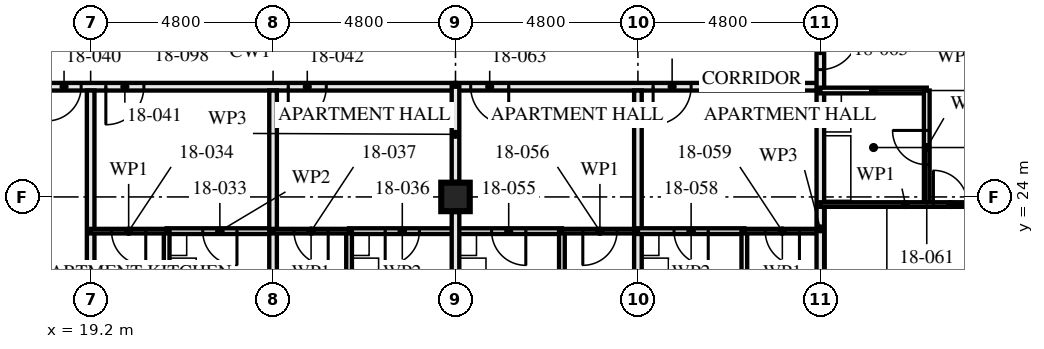
"""IFC4 building model, lengths in metres.
Left out: names, types, materials, properties, quantities, classifications, styles, units other than length and angle.
Written with IfcOpenShell. Run it as: python <this file> out.ifc"""

import sys

from ifc_helpers import new_model, si_unit, direction, frame, frame_2d, origin, origin_2d, place, context, subcontext, project, spatial, rectangle, hollow_rectangle, extrude, element, fill, save


model = new_model("IFC4")
c1 = context("Model", 3, precision=1e-05, world=origin(), true_north=direction((0.0, 1.0)))
c2 = subcontext(c1, "Body", "Model", "MODEL_VIEW")
j1 = project(units=[si_unit("LENGTHUNIT", "METRE"), si_unit("PLANEANGLEUNIT", "RADIAN")], contexts=[c1])
p1 = place(None, origin())
s1 = spatial("IfcSite", under=j1, at=p1, CompositionType="ELEMENT")
p2 = place(p1, origin())
s2 = spatial("IfcBuilding", under=s1, at=p2, CompositionType="ELEMENT")
p3 = place(p2, frame((0.0, 0.0, 69.0)))
s3 = spatial("IfcBuildingStorey", under=s2, at=p3, CompositionType="ELEMENT", Elevation=69.0)
p4 = place(p3, frame((28.8, 24.0, 0.0), z_axis=(0.0, 0.0, 1.0), x_axis=(1.0, 0.0, 0.0)))
e1 = element("IfcColumn", 1, at=p4, inside=s3, PredefinedType="COLUMN", context=c2, shape_type="SweptSolid", body=[
    extrude(hollow_rectangle(XDim=0.75, YDim=0.75, WallThickness=0.08, at=origin_2d()), origin(), (0.0, 0.0, 1.0), 3.5),
])
p5 = place(p3, frame((19.2, 14.72, 0.0), z_axis=(0.0, 0.0, 1.0), x_axis=(0.0, 1.0, 0.0)))
e2 = element("IfcWall", 2, at=p5, inside=s3, PredefinedType="PARTITIONING", context=c2, shape_type="SweptSolid", body=[
    extrude(rectangle(XDim=12.08, YDim=0.2, at=frame_2d((6.04, 0.0))), origin(), (0.0, 0.0, 1.0), 2.55),
])
p6 = place(p3, frame((21.2, 20.1, 0.0), z_axis=(0.0, 0.0, 1.0), x_axis=(0.0, 1.0, 0.0)))
e3 = element("IfcWall", 3, at=p6, inside=s3, PredefinedType="PARTITIONING", context=c2, shape_type="SweptSolid", body=[
    extrude(rectangle(XDim=3.0, YDim=0.15, at=frame_2d((1.5, 0.0))), origin(), (0.0, 0.0, 1.0), 3.33),
])
p7 = place(p3, frame((21.2, 23.1, 0.0), z_axis=(0.0, 0.0, 1.0), x_axis=(1.0, 0.0, 0.0)))
e4 = element("IfcWall", 4, at=p7, inside=s3, PredefinedType="PARTITIONING", context=c2, shape_type="SweptSolid", body=[
    extrude(rectangle(XDim=2.8, YDim=0.15, at=frame_2d((1.4, 0.0))), origin(), (0.0, 0.0, 1.0), 3.33),
])
p8 = place(p7, frame((0.95, 0.0, 0.0)))
e5 = element("IfcOpeningElement", 5, at=p8, cuts=e4, PredefinedType="OPENING", context=c2, shape_type="SweptSolid", body=[
    extrude(rectangle(XDim=0.9, YDim=2.1, at=frame_2d((0.45, 1.05))), frame((0.0, 0.085, 0.0), z_axis=(0.0, -1.0, 0.0), x_axis=(1.0, 0.0, 0.0)), (0.0, 0.0, 1.0), 0.171),
])
p9 = place(p3, frame((19.2, 23.1, 0.0), z_axis=(0.0, 0.0, 1.0), x_axis=(1.0, 0.0, 0.0)))
e6 = element("IfcWall", 6, at=p9, inside=s3, PredefinedType="PARTITIONING", context=c2, shape_type="SweptSolid", body=[
    extrude(rectangle(XDim=2.0, YDim=0.12, at=frame_2d((1.0, 0.0))), origin(), (0.0, 0.0, 1.0), 3.33),
])
p10 = place(p9, frame((0.55, 0.0, 0.0)))
e7 = element("IfcOpeningElement", 7, at=p10, cuts=e6, PredefinedType="OPENING", context=c2, shape_type="SweptSolid", body=[
    extrude(rectangle(XDim=0.9, YDim=2.1, at=frame_2d((0.45, 1.05))), frame((0.0, 0.071, 0.0), z_axis=(0.0, -1.0, 0.0), x_axis=(1.0, 0.0, 0.0)), (0.0, 0.0, 1.0), 0.141),
])
p11 = place(p3, frame((24.0, 14.72, 0.0), z_axis=(0.0, 0.0, 1.0), x_axis=(0.0, 1.0, 0.0)))
e8 = element("IfcWall", 8, at=p11, inside=s3, PredefinedType="PARTITIONING", context=c2, shape_type="SweptSolid", body=[
    extrude(rectangle(XDim=12.08, YDim=0.2, at=frame_2d((6.04, 0.0))), origin(), (0.0, 0.0, 1.0), 2.55),
])
p12 = place(p3, frame((26.0, 20.1, 0.0), z_axis=(0.0, 0.0, 1.0), x_axis=(0.0, 1.0, 0.0)))
e9 = element("IfcWall", 9, at=p12, inside=s3, PredefinedType="PARTITIONING", context=c2, shape_type="SweptSolid", body=[
    extrude(rectangle(XDim=3.0, YDim=0.15, at=frame_2d((1.5, 0.0))), origin(), (0.0, 0.0, 1.0), 3.33),
])
p13 = place(p3, frame((26.0, 23.1, 0.0), z_axis=(0.0, 0.0, 1.0), x_axis=(1.0, 0.0, 0.0)))
e10 = element("IfcWall", 10, at=p13, inside=s3, PredefinedType="PARTITIONING", context=c2, shape_type="SweptSolid", body=[
    extrude(rectangle(XDim=2.8, YDim=0.15, at=frame_2d((1.4, 0.0))), origin(), (0.0, 0.0, 1.0), 3.33),
])
p14 = place(p13, frame((0.95, 0.0, 0.0)))
e11 = element("IfcOpeningElement", 11, at=p14, cuts=e10, PredefinedType="OPENING", context=c2, shape_type="SweptSolid", body=[
    extrude(rectangle(XDim=0.9, YDim=2.1, at=frame_2d((0.45, 1.05))), frame((0.0, 0.085, 0.0), z_axis=(0.0, -1.0, 0.0), x_axis=(1.0, 0.0, 0.0)), (0.0, 0.0, 1.0), 0.171),
])
p15 = place(p3, frame((24.0, 23.1, 0.0), z_axis=(0.0, 0.0, 1.0), x_axis=(1.0, 0.0, 0.0)))
e12 = element("IfcWall", 12, at=p15, inside=s3, PredefinedType="PARTITIONING", context=c2, shape_type="SweptSolid", body=[
    extrude(rectangle(XDim=2.0, YDim=0.12, at=frame_2d((1.0, 0.0))), origin(), (0.0, 0.0, 1.0), 3.33),
])
p16 = place(p15, frame((0.55, 0.0, 0.0)))
e13 = element("IfcOpeningElement", 13, at=p16, cuts=e12, PredefinedType="OPENING", context=c2, shape_type="SweptSolid", body=[
    extrude(rectangle(XDim=0.9, YDim=2.1, at=frame_2d((0.45, 1.05))), frame((0.0, 0.071, 0.0), z_axis=(0.0, -1.0, 0.0), x_axis=(1.0, 0.0, 0.0)), (0.0, 0.0, 1.0), 0.141),
])
p17 = place(p3, frame((14.4, 26.9, 0.0), z_axis=(0.0, 0.0, 1.0), x_axis=(1.0, 0.0, 0.0)))
e14 = element("IfcWall", 14, at=p17, inside=s3, PredefinedType="PARTITIONING", context=c2, shape_type="SweptSolid", body=[
    extrude(rectangle(XDim=14.4, YDim=0.2, at=frame_2d((7.2, 0.0))), origin(), (0.0, 0.0, 1.0), 2.55),
])
p18 = place(p17, frame((1.4, 0.0, 0.0)))
e15 = element("IfcOpeningElement", 15, at=p18, cuts=e14, PredefinedType="OPENING", context=c2, shape_type="SweptSolid", body=[
    extrude(rectangle(XDim=1.0, YDim=2.1, at=frame_2d((0.5, 1.05))), frame((0.0, 0.111, 0.0), z_axis=(0.0, -1.0, 0.0), x_axis=(1.0, 0.0, 0.0)), (0.0, 0.0, 1.0), 0.221),
])
p19 = place(p17, frame((3.65, 0.0, 0.0)))
e16 = element("IfcOpeningElement", 16, at=p19, cuts=e14, PredefinedType="OPENING", context=c2, shape_type="SweptSolid", body=[
    extrude(rectangle(XDim=0.9, YDim=2.1, at=frame_2d((0.45, 1.05))), frame((0.0, 0.111, 0.0), z_axis=(0.0, -1.0, 0.0), x_axis=(1.0, 0.0, 0.0)), (0.0, 0.0, 1.0), 0.221),
])
p20 = place(p17, frame((5.2, 0.0, 0.0)))
e17 = element("IfcOpeningElement", 17, at=p20, cuts=e14, PredefinedType="OPENING", context=c2, shape_type="SweptSolid", body=[
    extrude(rectangle(XDim=1.0, YDim=2.1, at=frame_2d((0.5, 1.05))), frame((0.0, 0.111, 0.0), z_axis=(0.0, -1.0, 0.0), x_axis=(1.0, 0.0, 0.0)), (0.0, 0.0, 1.0), 0.221),
])
p21 = place(p17, frame((10.0, 0.0, 0.0)))
e18 = element("IfcOpeningElement", 18, at=p21, cuts=e14, PredefinedType="OPENING", context=c2, shape_type="SweptSolid", body=[
    extrude(rectangle(XDim=1.0, YDim=2.1, at=frame_2d((0.5, 1.05))), frame((0.0, 0.111, 0.0), z_axis=(0.0, -1.0, 0.0), x_axis=(1.0, 0.0, 0.0)), (0.0, 0.0, 1.0), 0.221),
])
p22 = place(p3, frame((31.6, 20.1, 0.0), z_axis=(0.0, 0.0, 1.0), x_axis=(0.0, 1.0, 0.0)))
e19 = element("IfcWall", 19, at=p22, inside=s3, PredefinedType="PARTITIONING", context=c2, shape_type="SweptSolid", body=[
    extrude(rectangle(XDim=3.0, YDim=0.15, at=frame_2d((1.5, 0.0))), origin(), (0.0, 0.0, 1.0), 3.33),
])
p23 = place(p3, frame((28.8, 23.1, 0.0), z_axis=(0.0, 0.0, 1.0), x_axis=(1.0, 0.0, 0.0)))
e20 = element("IfcWall", 20, at=p23, inside=s3, PredefinedType="PARTITIONING", context=c2, shape_type="SweptSolid", body=[
    extrude(rectangle(XDim=2.8, YDim=0.15, at=frame_2d((1.4, 0.0))), origin(), (0.0, 0.0, 1.0), 3.33),
])
p24 = place(p23, frame((0.95, 0.0, 0.0)))
e21 = element("IfcOpeningElement", 21, at=p24, cuts=e20, PredefinedType="OPENING", context=c2, shape_type="SweptSolid", body=[
    extrude(rectangle(XDim=0.9, YDim=2.1, at=frame_2d((0.45, 1.05))), frame((0.0, 0.085, 0.0), z_axis=(0.0, -1.0, 0.0), x_axis=(1.0, 0.0, 0.0)), (0.0, 0.0, 1.0), 0.171),
])
p25 = place(p3, frame((31.6, 23.1, 0.0), z_axis=(0.0, 0.0, 1.0), x_axis=(1.0, 0.0, 0.0)))
e22 = element("IfcWall", 22, at=p25, inside=s3, PredefinedType="PARTITIONING", context=c2, shape_type="SweptSolid", body=[
    extrude(rectangle(XDim=2.0, YDim=0.12, at=frame_2d((1.0, 0.0))), origin(), (0.0, 0.0, 1.0), 3.33),
])
p26 = place(p25, frame((0.55, 0.0, 0.0)))
e23 = element("IfcOpeningElement", 23, at=p26, cuts=e22, PredefinedType="OPENING", context=c2, shape_type="SweptSolid", body=[
    extrude(rectangle(XDim=0.9, YDim=2.1, at=frame_2d((0.45, 1.05))), frame((0.0, 0.071, 0.0), z_axis=(0.0, -1.0, 0.0), x_axis=(1.0, 0.0, 0.0)), (0.0, 0.0, 1.0), 0.141),
])
p27 = place(p3, frame((33.6, 14.72, 0.0), z_axis=(0.0, 0.0, 1.0), x_axis=(0.0, 1.0, 0.0)))
e24 = element("IfcWall", 24, at=p27, inside=s3, PredefinedType="PARTITIONING", context=c2, shape_type="SweptSolid", body=[
    extrude(rectangle(XDim=12.08, YDim=0.2, at=frame_2d((6.04, 0.0))), origin(), (0.0, 0.0, 1.0), 2.55),
])
p28 = place(p3, frame((36.4, 20.1, 0.0), z_axis=(0.0, 0.0, 1.0), x_axis=(0.0, 1.0, 0.0)))
e25 = element("IfcWall", 25, at=p28, inside=s3, PredefinedType="PARTITIONING", context=c2, shape_type="SweptSolid", body=[
    extrude(rectangle(XDim=3.0, YDim=0.15, at=frame_2d((1.5, 0.0))), origin(), (0.0, 0.0, 1.0), 3.33),
])
p29 = place(p3, frame((33.6, 23.1, 0.0), z_axis=(0.0, 0.0, 1.0), x_axis=(1.0, 0.0, 0.0)))
e26 = element("IfcWall", 26, at=p29, inside=s3, PredefinedType="PARTITIONING", context=c2, shape_type="SweptSolid", body=[
    extrude(rectangle(XDim=2.8, YDim=0.15, at=frame_2d((1.4, 0.0))), origin(), (0.0, 0.0, 1.0), 3.33),
])
p30 = place(p29, frame((0.95, 0.0, 0.0)))
e27 = element("IfcOpeningElement", 27, at=p30, cuts=e26, PredefinedType="OPENING", context=c2, shape_type="SweptSolid", body=[
    extrude(rectangle(XDim=0.9, YDim=2.1, at=frame_2d((0.45, 1.05))), frame((0.0, 0.085, 0.0), z_axis=(0.0, -1.0, 0.0), x_axis=(1.0, 0.0, 0.0)), (0.0, 0.0, 1.0), 0.171),
])
p31 = place(p3, frame((36.4, 23.1, 0.0), z_axis=(0.0, 0.0, 1.0), x_axis=(1.0, 0.0, 0.0)))
e28 = element("IfcWall", 28, at=p31, inside=s3, PredefinedType="PARTITIONING", context=c2, shape_type="SweptSolid", body=[
    extrude(rectangle(XDim=2.0, YDim=0.12, at=frame_2d((1.0, 0.0))), origin(), (0.0, 0.0, 1.0), 3.33),
])
p32 = place(p31, frame((0.55, 0.0, 0.0)))
e29 = element("IfcOpeningElement", 29, at=p32, cuts=e28, PredefinedType="OPENING", context=c2, shape_type="SweptSolid", body=[
    extrude(rectangle(XDim=0.9, YDim=2.1, at=frame_2d((0.45, 1.05))), frame((0.0, 0.071, 0.0), z_axis=(0.0, -1.0, 0.0), x_axis=(1.0, 0.0, 0.0)), (0.0, 0.0, 1.0), 0.141),
])
p33 = place(p3, frame((38.4, 19.52, 0.0), z_axis=(0.0, 0.0, 1.0), x_axis=(0.0, 1.0, 0.0)))
e30 = element("IfcWall", 30, at=p33, inside=s3, PredefinedType="PARTITIONING", context=c2, shape_type="SweptSolid", body=[
    extrude(rectangle(XDim=7.28, YDim=0.2, at=frame_2d((3.64, 0.0))), origin(), (0.0, 0.0, 1.0), 2.55),
])
p34 = place(p3, frame((41.2, 23.8, 0.0), z_axis=(0.0, 0.0, 1.0), x_axis=(0.0, 1.0, 0.0)))
e31 = element("IfcWall", 31, at=p34, inside=s3, PredefinedType="PARTITIONING", context=c2, shape_type="SweptSolid", body=[
    extrude(rectangle(XDim=3.0, YDim=0.15, at=frame_2d((1.5, 0.0))), origin(), (0.0, 0.0, 1.0), 2.55),
])
p35 = place(p34, frame((1.05, 0.0, 0.0)))
e32 = element("IfcOpeningElement", 32, at=p35, cuts=e31, PredefinedType="OPENING", context=c2, shape_type="SweptSolid", body=[
    extrude(rectangle(XDim=0.9, YDim=2.1, at=frame_2d((0.45, 1.05))), frame((0.0, 0.085, 0.0), z_axis=(0.0, -1.0, 0.0), x_axis=(1.0, 0.0, 0.0)), (0.0, 0.0, 1.0), 0.171),
])
p36 = place(p3, frame((38.4, 26.8, 0.0), z_axis=(0.0, 0.0, 1.0), x_axis=(1.0, 0.0, 0.0)))
e33 = element("IfcWall", 33, at=p36, inside=s3, PredefinedType="PARTITIONING", context=c2, shape_type="SweptSolid", body=[
    extrude(rectangle(XDim=2.8, YDim=0.15, at=frame_2d((1.4, 0.0))), origin(), (0.0, 0.0, 1.0), 3.33),
])
p37 = place(p3, frame((38.4, 23.8, 0.0), z_axis=(0.0, 0.0, 1.0), x_axis=(1.0, 0.0, 0.0)))
e34 = element("IfcWall", 34, at=p37, inside=s3, PredefinedType="PARTITIONING", context=c2, shape_type="SweptSolid", body=[
    extrude(rectangle(XDim=4.48, YDim=0.12, at=frame_2d((2.24, 0.0))), origin(), (0.0, 0.0, 1.0), 3.33),
])
p38 = place(p37, frame((2.975, 0.0, 0.0)))
e35 = element("IfcOpeningElement", 35, at=p38, cuts=e34, PredefinedType="OPENING", context=c2, shape_type="SweptSolid", body=[
    extrude(rectangle(XDim=0.9, YDim=2.1, at=frame_2d((0.45, 1.05))), frame((0.0, 0.071, 0.0), z_axis=(0.0, -1.0, 0.0), x_axis=(1.0, 0.0, 0.0)), (0.0, 0.0, 1.0), 0.141),
])
p39 = place(p3, frame((28.8, 26.9, 0.0), z_axis=(0.0, 0.0, 1.0), x_axis=(1.0, 0.0, 0.0)))
e36 = element("IfcWall", 36, at=p39, inside=s3, PredefinedType="PARTITIONING", context=c2, shape_type="SweptSolid", body=[
    extrude(rectangle(XDim=9.6, YDim=0.2, at=frame_2d((4.8, 0.0))), origin(), (0.0, 0.0, 1.0), 3.33),
])
p40 = place(p39, frame((0.4, 0.0, 0.0)))
e37 = element("IfcOpeningElement", 37, at=p40, cuts=e36, PredefinedType="OPENING", context=c2, shape_type="SweptSolid", body=[
    extrude(rectangle(XDim=1.0, YDim=2.1, at=frame_2d((0.5, 1.05))), frame((0.0, 0.111, 0.0), z_axis=(0.0, -1.0, 0.0), x_axis=(1.0, 0.0, 0.0)), (0.0, 0.0, 1.0), 0.221),
])
p41 = place(p39, frame((5.2, 0.0, 0.0)))
e38 = element("IfcOpeningElement", 38, at=p41, cuts=e36, PredefinedType="OPENING", context=c2, shape_type="SweptSolid", body=[
    extrude(rectangle(XDim=1.0, YDim=2.1, at=frame_2d((0.5, 1.05))), frame((0.0, 0.111, 0.0), z_axis=(0.0, -1.0, 0.0), x_axis=(1.0, 0.0, 0.0)), (0.0, 0.0, 1.0), 0.221),
])
p42 = place(p3, frame((38.4, 26.8, 0.0), z_axis=(0.0, 0.0, 1.0), x_axis=(0.0, 1.0, 0.0)))
e39 = element("IfcWall", 39, at=p42, inside=s3, PredefinedType="PARTITIONING", context=c2, shape_type="SweptSolid", body=[
    extrude(rectangle(XDim=1.605, YDim=0.2, at=frame_2d((0.802, 0.0))), origin(), (0.0, 0.0, 1.0), 3.33),
])
p43 = place(p42, frame((0.55, 0.0, 0.0)))
e40 = element("IfcOpeningElement", 40, at=p43, cuts=e39, PredefinedType="OPENING", context=c2, shape_type="SweptSolid", body=[
    extrude(rectangle(XDim=1.0, YDim=2.1, at=frame_2d((0.5, 1.05))), frame((0.0, 0.111, 0.0), z_axis=(0.0, -1.0, 0.0), x_axis=(1.0, 0.0, 0.0)), (0.0, 0.0, 1.0), 0.221),
])
p44 = place(p3, frame((28.8, 19.595, 0.0), z_axis=(0.0, 0.0, 1.0), x_axis=(0.0, 1.0, 0.0)))
e41 = element("IfcWall", 41, at=p44, inside=s3, PredefinedType="PARTITIONING", context=c2, shape_type="SweptSolid", body=[
    extrude(rectangle(XDim=4.01, YDim=0.2, at=frame_2d((2.005, 0.0))), origin(), (0.0, 0.0, 1.0), 2.32),
])
p45 = place(p3, frame((28.8, 24.395, 0.0), z_axis=(0.0, 0.0, 1.0), x_axis=(0.0, 1.0, 0.0)))
e42 = element("IfcWall", 42, at=p45, inside=s3, PredefinedType="PARTITIONING", context=c2, shape_type="SweptSolid", body=[
    extrude(rectangle(XDim=2.505, YDim=0.2, at=frame_2d((1.252, 0.0))), origin(), (0.0, 0.0, 1.0), 2.32),
])
p46 = place(p8, frame((0.9, 0.0, 0.0), z_axis=(0.0, 0.0, 1.0), x_axis=(-1.0, 0.0, 0.0)))
e43 = element("IfcDoor", 43, at=p46, inside=s3, OperationType="SINGLE_SWING_RIGHT", PredefinedType="DOOR", context=c2, shape_type="SweptSolid", body=[
    extrude(rectangle(XDim=0.9, YDim=2.1, at=frame_2d((0.45, 1.05))), frame((0.0, 0.022, 0.0), z_axis=(0.0, -1.0, 0.0), x_axis=(1.0, 0.0, 0.0)), (0.0, 0.0, 1.0), 0.044),
])
fill(e5, e43)
p47 = place(p10, frame((0.9, 0.0, 0.0), z_axis=(0.0, 0.0, 1.0), x_axis=(-1.0, 0.0, 0.0)))
e44 = element("IfcDoor", 44, at=p47, inside=s3, OperationType="SINGLE_SWING_RIGHT", PredefinedType="DOOR", context=c2, shape_type="SweptSolid", body=[
    extrude(rectangle(XDim=0.9, YDim=2.1, at=frame_2d((0.45, 1.05))), frame((0.0, 0.022, 0.0), z_axis=(0.0, -1.0, 0.0), x_axis=(1.0, 0.0, 0.0)), (0.0, 0.0, 1.0), 0.044),
])
fill(e7, e44)
p48 = place(p14, frame((0.9, 0.0, 0.0), z_axis=(0.0, 0.0, 1.0), x_axis=(-1.0, 0.0, 0.0)))
e45 = element("IfcDoor", 45, at=p48, inside=s3, OperationType="SINGLE_SWING_LEFT", PredefinedType="DOOR", context=c2, shape_type="SweptSolid", body=[
    extrude(rectangle(XDim=0.9, YDim=2.1, at=frame_2d((0.45, 1.05))), frame((0.0, 0.022, 0.0), z_axis=(0.0, -1.0, 0.0), x_axis=(1.0, 0.0, 0.0)), (0.0, 0.0, 1.0), 0.044),
])
fill(e11, e45)
p49 = place(p16, frame((0.9, 0.0, 0.0), z_axis=(0.0, 0.0, 1.0), x_axis=(-1.0, 0.0, 0.0)))
e46 = element("IfcDoor", 46, at=p49, inside=s3, OperationType="SINGLE_SWING_RIGHT", PredefinedType="DOOR", context=c2, shape_type="SweptSolid", body=[
    extrude(rectangle(XDim=0.9, YDim=2.1, at=frame_2d((0.45, 1.05))), frame((0.0, 0.022, 0.0), z_axis=(0.0, -1.0, 0.0), x_axis=(1.0, 0.0, 0.0)), (0.0, 0.0, 1.0), 0.044),
])
fill(e13, e46)
p50 = place(p19, frame((0.9, 0.0, 0.0), z_axis=(0.0, 0.0, 1.0), x_axis=(-1.0, 0.0, 0.0)))
e47 = element("IfcDoor", 47, at=p50, inside=s3, OperationType="SINGLE_SWING_LEFT", PredefinedType="DOOR", context=c2, shape_type="SweptSolid", body=[
    extrude(rectangle(XDim=0.9, YDim=2.1, at=frame_2d((0.45, 1.05))), frame((0.0, 0.027, 0.0), z_axis=(0.0, -1.0, 0.0), x_axis=(1.0, 0.0, 0.0)), (0.0, 0.0, 1.0), 0.054),
])
fill(e16, e47)
p51 = place(p20, frame((1.0, 0.0, 0.0), z_axis=(0.0, 0.0, 1.0), x_axis=(-1.0, 0.0, 0.0)))
e48 = element("IfcDoor", 48, at=p51, inside=s3, OperationType="SINGLE_SWING_LEFT", PredefinedType="DOOR", context=c2, shape_type="SweptSolid", body=[
    extrude(rectangle(XDim=1.0, YDim=2.1, at=frame_2d((0.5, 1.05))), frame((0.0, 0.027, 0.0), z_axis=(0.0, -1.0, 0.0), x_axis=(1.0, 0.0, 0.0)), (0.0, 0.0, 1.0), 0.054),
])
fill(e17, e48)
p52 = place(p21, frame((1.0, 0.0, 0.0), z_axis=(0.0, 0.0, 1.0), x_axis=(-1.0, 0.0, 0.0)))
e49 = element("IfcDoor", 49, at=p52, inside=s3, OperationType="SINGLE_SWING_LEFT", PredefinedType="DOOR", context=c2, shape_type="SweptSolid", body=[
    extrude(rectangle(XDim=1.0, YDim=2.1, at=frame_2d((0.5, 1.05))), frame((0.0, 0.027, 0.0), z_axis=(0.0, -1.0, 0.0), x_axis=(1.0, 0.0, 0.0)), (0.0, 0.0, 1.0), 0.054),
])
fill(e18, e49)
p53 = place(p24, frame((0.9, 0.0, 0.0), z_axis=(0.0, 0.0, 1.0), x_axis=(-1.0, 0.0, 0.0)))
e50 = element("IfcDoor", 50, at=p53, inside=s3, OperationType="SINGLE_SWING_RIGHT", PredefinedType="DOOR", context=c2, shape_type="SweptSolid", body=[
    extrude(rectangle(XDim=0.9, YDim=2.1, at=frame_2d((0.45, 1.05))), frame((0.0, 0.022, 0.0), z_axis=(0.0, -1.0, 0.0), x_axis=(1.0, 0.0, 0.0)), (0.0, 0.0, 1.0), 0.044),
])
fill(e21, e50)
p54 = place(p26, frame((0.9, 0.0, 0.0), z_axis=(0.0, 0.0, 1.0), x_axis=(-1.0, 0.0, 0.0)))
e51 = element("IfcDoor", 51, at=p54, inside=s3, OperationType="SINGLE_SWING_LEFT", PredefinedType="DOOR", context=c2, shape_type="SweptSolid", body=[
    extrude(rectangle(XDim=0.9, YDim=2.1, at=frame_2d((0.45, 1.05))), frame((0.0, 0.022, 0.0), z_axis=(0.0, -1.0, 0.0), x_axis=(1.0, 0.0, 0.0)), (0.0, 0.0, 1.0), 0.044),
])
fill(e23, e51)
p55 = place(p30, frame((0.9, 0.0, 0.0), z_axis=(0.0, 0.0, 1.0), x_axis=(-1.0, 0.0, 0.0)))
e52 = element("IfcDoor", 52, at=p55, inside=s3, OperationType="SINGLE_SWING_RIGHT", PredefinedType="DOOR", context=c2, shape_type="SweptSolid", body=[
    extrude(rectangle(XDim=0.9, YDim=2.1, at=frame_2d((0.45, 1.05))), frame((0.0, 0.022, 0.0), z_axis=(0.0, -1.0, 0.0), x_axis=(1.0, 0.0, 0.0)), (0.0, 0.0, 1.0), 0.044),
])
fill(e27, e52)
p56 = place(p32, frame((0.9, 0.0, 0.0), z_axis=(0.0, 0.0, 1.0), x_axis=(-1.0, 0.0, 0.0)))
e53 = element("IfcDoor", 53, at=p56, inside=s3, OperationType="SINGLE_SWING_RIGHT", PredefinedType="DOOR", context=c2, shape_type="SweptSolid", body=[
    extrude(rectangle(XDim=0.9, YDim=2.1, at=frame_2d((0.45, 1.05))), frame((0.0, 0.022, 0.0), z_axis=(0.0, -1.0, 0.0), x_axis=(1.0, 0.0, 0.0)), (0.0, 0.0, 1.0), 0.044),
])
fill(e29, e53)
p57 = place(p35, origin())
e54 = element("IfcDoor", 54, at=p57, inside=s3, OperationType="SINGLE_SWING_LEFT", PredefinedType="DOOR", context=c2, shape_type="SweptSolid", body=[
    extrude(rectangle(XDim=0.9, YDim=2.1, at=frame_2d((0.45, 1.05))), frame((0.0, 0.022, 0.0), z_axis=(0.0, -1.0, 0.0), x_axis=(1.0, 0.0, 0.0)), (0.0, 0.0, 1.0), 0.044),
])
fill(e32, e54)
p58 = place(p38, origin())
e55 = element("IfcDoor", 55, at=p58, inside=s3, OperationType="SINGLE_SWING_RIGHT", PredefinedType="DOOR", context=c2, shape_type="SweptSolid", body=[
    extrude(rectangle(XDim=0.9, YDim=2.1, at=frame_2d((0.45, 1.05))), frame((0.0, 0.022, 0.0), z_axis=(0.0, -1.0, 0.0), x_axis=(1.0, 0.0, 0.0)), (0.0, 0.0, 1.0), 0.044),
])
fill(e35, e55)
p59 = place(p40, frame((1.0, 0.0, 0.0), z_axis=(0.0, 0.0, 1.0), x_axis=(-1.0, 0.0, 0.0)))
e56 = element("IfcDoor", 56, at=p59, inside=s3, OperationType="SINGLE_SWING_RIGHT", PredefinedType="DOOR", context=c2, shape_type="SweptSolid", body=[
    extrude(rectangle(XDim=1.0, YDim=2.1, at=frame_2d((0.5, 1.05))), frame((0.0, 0.027, 0.0), z_axis=(0.0, -1.0, 0.0), x_axis=(1.0, 0.0, 0.0)), (0.0, 0.0, 1.0), 0.054),
])
fill(e37, e56)
p60 = place(p41, frame((1.0, 0.0, 0.0), z_axis=(0.0, 0.0, 1.0), x_axis=(-1.0, 0.0, 0.0)))
e57 = element("IfcDoor", 57, at=p60, inside=s3, OperationType="SINGLE_SWING_LEFT", PredefinedType="DOOR", context=c2, shape_type="SweptSolid", body=[
    extrude(rectangle(XDim=1.0, YDim=2.1, at=frame_2d((0.5, 1.05))), frame((0.0, 0.027, 0.0), z_axis=(0.0, -1.0, 0.0), x_axis=(1.0, 0.0, 0.0)), (0.0, 0.0, 1.0), 0.054),
])
fill(e38, e57)
p61 = place(p43, frame((1.0, 0.0, 0.0), z_axis=(0.0, 0.0, 1.0), x_axis=(-1.0, 0.0, 0.0)))
e58 = element("IfcDoor", 58, at=p61, inside=s3, OperationType="SINGLE_SWING_RIGHT", PredefinedType="DOOR", context=c2, shape_type="SweptSolid", body=[
    extrude(rectangle(XDim=1.0, YDim=2.1, at=frame_2d((0.5, 1.05))), frame((0.0, 0.027, 0.0), z_axis=(0.0, -1.0, 0.0), x_axis=(1.0, 0.0, 0.0)), (0.0, 0.0, 1.0), 0.054),
])
fill(e40, e58)
save(model, sys.argv[1])
